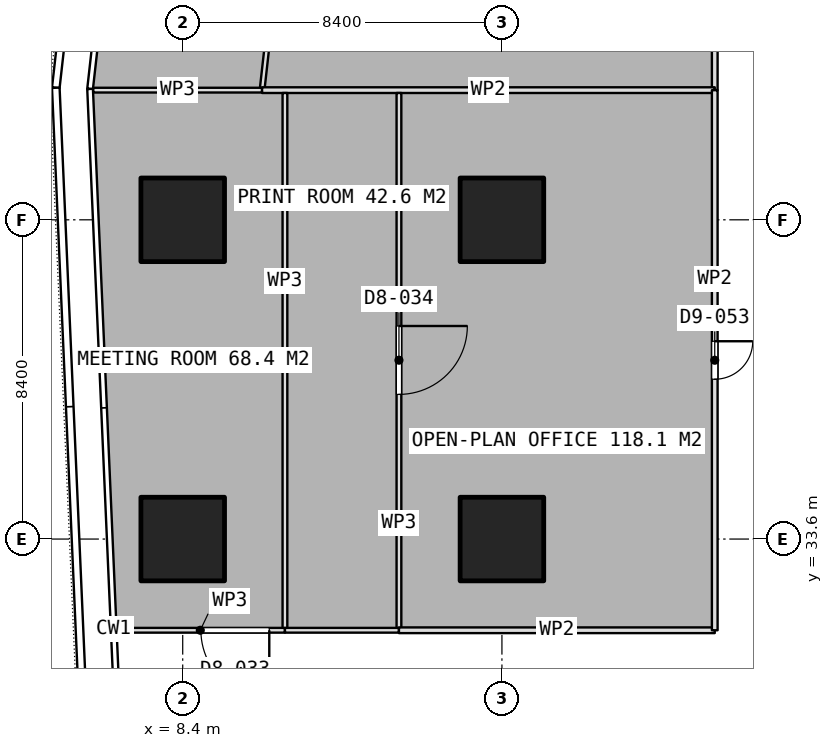
"""IFC4 building model, lengths in metres.
Left out: names, types, materials, properties, quantities, classifications, styles, units other than length and angle.
Written with IfcOpenShell. Run it as: python <this file> out.ifc"""

import sys

from ifc_helpers import new_model, si_unit, direction, frame, frame_2d, origin, origin_2d, place, context, subcontext, project, spatial, rectangle, extrude, element, fill, save


model = new_model("IFC4")
c1 = context("Model", 3, precision=1e-05, world=origin(), true_north=direction((0.0, 1.0)))
c2 = subcontext(c1, "Body", "Model", "MODEL_VIEW")
j1 = project(units=[si_unit("LENGTHUNIT", "METRE"), si_unit("PLANEANGLEUNIT", "RADIAN")], contexts=[c1])
p1 = place(None, origin())
s1 = spatial("IfcSite", under=j1, at=p1, CompositionType="ELEMENT")
p2 = place(p1, origin())
s2 = spatial("IfcBuilding", under=s1, at=p2, CompositionType="ELEMENT")
p3 = place(p2, frame((0.0, 0.0, 32.9)))
s3 = spatial("IfcBuildingStorey", under=s2, at=p3, CompositionType="ELEMENT", Elevation=32.9)
for number, where, z_axis, x_axis in (
    (1, (8.4, 33.6, 0.0), (0.0, 0.0, 1.0), (1.0, 0.0, 0.0)),
    (2, (8.4, 42.0, 0.0), (0.0, 0.0, 1.0), (1.0, 0.0, 0.0)),
    (3, (16.8, 33.6, 0.0), (0.0, 0.0, 1.0), (1.0, 0.0, 0.0)),
    (4, (16.8, 42.0, 0.0), (0.0, 0.0, 1.0), (1.0, 0.0, 0.0)),
):
    element("IfcColumn", number, at=place(p3, frame(where, z_axis=z_axis, x_axis=x_axis)), inside=s3, PredefinedType="COLUMN", context=c2, shape_type="SweptSolid", body=[
        extrude(rectangle(XDim=2.2, YDim=2.2, at=origin_2d()), origin(), (0.0, 0.0, 1.0), 3.75),
    ])
p4 = place(p3, frame((11.185, 51.62, 0.0), z_axis=(0.0, 0.0, 1.0), x_axis=(-0.111576721485, -0.993755822737, 0.0)))
e5 = element("IfcWall", 5, at=p4, inside=s3, PredefinedType="PARTITIONING", context=c2, shape_type="SweptSolid", body=[
    extrude(rectangle(XDim=6.247, YDim=0.125, at=frame_2d((3.124, 0.0))), origin(), (0.0, 0.0, 1.0), 3.5),
])
p5 = place(p4, frame((2.624, 0.0, 0.0)))
e6 = element("IfcOpeningElement", 6, at=p5, cuts=e5, PredefinedType="OPENING", context=c2, shape_type="SweptSolid", body=[
    extrude(rectangle(XDim=1.0, YDim=2.1, at=frame_2d((0.5, 1.05))), frame((0.0, 0.073, 0.0), z_axis=(0.0, -1.0, 0.0), x_axis=(1.0, 0.0, 0.0)), (0.0, 0.0, 1.0), 0.145),
])
p6 = place(p3, frame((10.488, 45.412, 0.0), z_axis=(0.0, 0.0, 1.0), x_axis=(-1.0, 0.0, 0.0)))
e7 = element("IfcWall", 7, at=p6, inside=s3, PredefinedType="PARTITIONING", context=c2, shape_type="SweptSolid", body=[
    extrude(rectangle(XDim=4.444, YDim=0.125, at=frame_2d((2.222, 0.0))), origin(), (0.0, 0.0, 1.0), 3.5),
])
p7 = place(p3, frame((22.4, 53.0, 0.0), z_axis=(0.0, 0.0, 1.0), x_axis=(0.0, -1.0, 0.0)))
e8 = element("IfcWall", 8, at=p7, inside=s3, PredefinedType="PARTITIONING", context=c2, shape_type="SweptSolid", body=[
    extrude(rectangle(XDim=7.588, YDim=0.15, at=frame_2d((3.794, 0.0))), origin(), (0.0, 0.0, 1.0), 3.5),
])
p8 = place(p7, frame((3.294, 0.0, 0.0)))
e9 = element("IfcOpeningElement", 9, at=p8, cuts=e8, PredefinedType="OPENING", context=c2, shape_type="SweptSolid", body=[
    extrude(rectangle(XDim=1.0, YDim=2.1, at=frame_2d((0.5, 1.05))), frame((0.0, 0.085, 0.0), z_axis=(0.0, -1.0, 0.0), x_axis=(1.0, 0.0, 0.0)), (0.0, 0.0, 1.0), 0.17),
])
p9 = place(p3, frame((22.4, 45.412, 0.0), z_axis=(0.0, 0.0, 1.0), x_axis=(-1.0, 0.0, 0.0)))
e10 = element("IfcWall", 10, at=p9, inside=s3, PredefinedType="PARTITIONING", context=c2, shape_type="SweptSolid", body=[
    extrude(rectangle(XDim=11.912, YDim=0.15, at=frame_2d((5.956, 0.0))), origin(), (0.0, 0.0, 1.0), 3.5),
])
p10 = place(p3, frame((11.09, 45.337, 0.0), z_axis=(0.0, 0.0, 1.0), x_axis=(0.0, -1.0, 0.0)))
e11 = element("IfcWall", 11, at=p10, inside=s3, PredefinedType="PARTITIONING", context=c2, shape_type="SweptSolid", body=[
    extrude(rectangle(XDim=14.136, YDim=0.125, at=frame_2d((7.068, 0.0))), origin(), (0.0, 0.0, 1.0), 3.5),
])
p11 = place(p3, frame((11.09, 31.2, 0.0), z_axis=(0.0, 0.0, 1.0), x_axis=(-1.0, 0.0, 0.0)))
e12 = element("IfcWall", 12, at=p11, inside=s3, PredefinedType="PARTITIONING", context=c2, shape_type="SweptSolid", body=[
    extrude(rectangle(XDim=4.455, YDim=0.125, at=frame_2d((2.228, 0.0))), origin(), (0.0, 0.0, 1.0), 3.5),
])
p12 = place(p11, frame((0.412, 0.0, 0.0)))
e13 = element("IfcOpeningElement", 13, at=p12, cuts=e12, PredefinedType="OPENING", context=c2, shape_type="SweptSolid", body=[
    extrude(rectangle(XDim=1.8, YDim=2.1, at=frame_2d((0.9, 1.05))), frame((0.0, 0.073, 0.0), z_axis=(0.0, -1.0, 0.0), x_axis=(1.0, 0.0, 0.0)), (0.0, 0.0, 1.0), 0.145),
])
p13 = place(p3, frame((14.09, 45.337, 0.0), z_axis=(0.0, 0.0, 1.0), x_axis=(0.0, -1.0, 0.0)))
e14 = element("IfcWall", 14, at=p13, inside=s3, PredefinedType="PARTITIONING", context=c2, shape_type="SweptSolid", body=[
    extrude(rectangle(XDim=14.137, YDim=0.125, at=frame_2d((7.068, 0.0))), origin(), (0.0, 0.0, 1.0), 3.5),
])
p14 = place(p13, frame((6.131, 0.0, 0.0)))
e15 = element("IfcOpeningElement", 15, at=p14, cuts=e14, PredefinedType="OPENING", context=c2, shape_type="SweptSolid", body=[
    extrude(rectangle(XDim=1.8, YDim=2.1, at=frame_2d((0.9, 1.05))), frame((0.0, 0.073, 0.0), z_axis=(0.0, -1.0, 0.0), x_axis=(1.0, 0.0, 0.0)), (0.0, 0.0, 1.0), 0.145),
])
p15 = place(p3, frame((14.09, 31.2, 0.0), z_axis=(0.0, 0.0, 1.0), x_axis=(-1.0, 0.0, 0.0)))
e16 = element("IfcWall", 16, at=p15, inside=s3, PredefinedType="PARTITIONING", context=c2, shape_type="SweptSolid", body=[
    extrude(rectangle(XDim=3.0, YDim=0.125, at=frame_2d((1.5, 0.0))), origin(), (0.0, 0.0, 1.0), 3.5),
])
p16 = place(p3, frame((22.4, 31.2, 0.0), z_axis=(0.0, 0.0, 1.0), x_axis=(-1.0, 0.0, 0.0)))
e17 = element("IfcWall", 17, at=p16, inside=s3, PredefinedType="PARTITIONING", context=c2, shape_type="SweptSolid", body=[
    extrude(rectangle(XDim=8.31, YDim=0.15, at=frame_2d((4.155, 0.0))), origin(), (0.0, 0.0, 1.0), 3.5),
])
p17 = place(p3, frame((22.4, 45.411, 0.0), z_axis=(0.0, 0.0, 1.0), x_axis=(0.0, -1.0, 0.0)))
e18 = element("IfcWall", 18, at=p17, inside=s3, PredefinedType="PARTITIONING", context=c2, shape_type="SweptSolid", body=[
    extrude(rectangle(XDim=14.211, YDim=0.15, at=frame_2d((7.105, 0.0))), origin(), (0.0, 0.0, 1.0), 3.5),
])
p18 = place(p17, frame((6.606, 0.0, 0.0)))
e19 = element("IfcOpeningElement", 19, at=p18, cuts=e18, PredefinedType="OPENING", context=c2, shape_type="SweptSolid", body=[
    extrude(rectangle(XDim=1.0, YDim=2.1, at=frame_2d((0.5, 1.05))), frame((0.0, 0.085, 0.0), z_axis=(0.0, -1.0, 0.0), x_axis=(1.0, 0.0, 0.0)), (0.0, 0.0, 1.0), 0.17),
])
p19 = place(p12, origin())
e20 = element("IfcDoor", 20, at=p19, inside=s3, OperationType="DOUBLE_DOOR_SINGLE_SWING", PredefinedType="DOOR", context=c2, shape_type="SweptSolid", body=[
    extrude(rectangle(XDim=1.8, YDim=2.1, at=frame_2d((0.9, 1.05))), frame((0.0, 0.025, 0.0), z_axis=(0.0, -1.0, 0.0), x_axis=(1.0, 0.0, 0.0)), (0.0, 0.0, 1.0), 0.05),
])
fill(e13, e20)
p20 = place(p14, origin())
e21 = element("IfcDoor", 21, at=p20, inside=s3, OperationType="DOUBLE_DOOR_SINGLE_SWING", PredefinedType="DOOR", context=c2, shape_type="SweptSolid", body=[
    extrude(rectangle(XDim=1.8, YDim=2.1, at=frame_2d((0.9, 1.05))), frame((0.0, 0.025, 0.0), z_axis=(0.0, -1.0, 0.0), x_axis=(1.0, 0.0, 0.0)), (0.0, 0.0, 1.0), 0.05),
])
fill(e15, e21)
p21 = place(p18, origin())
e22 = element("IfcDoor", 22, at=p21, inside=s3, OperationType="SINGLE_SWING_LEFT", PredefinedType="DOOR", context=c2, shape_type="SweptSolid", body=[
    extrude(rectangle(XDim=1.0, YDim=2.1, at=frame_2d((0.5, 1.05))), frame((0.0, 0.025, 0.0), z_axis=(0.0, -1.0, 0.0), x_axis=(1.0, 0.0, 0.0)), (0.0, 0.0, 1.0), 0.05),
])
fill(e19, e22)
save(model, sys.argv[1])
